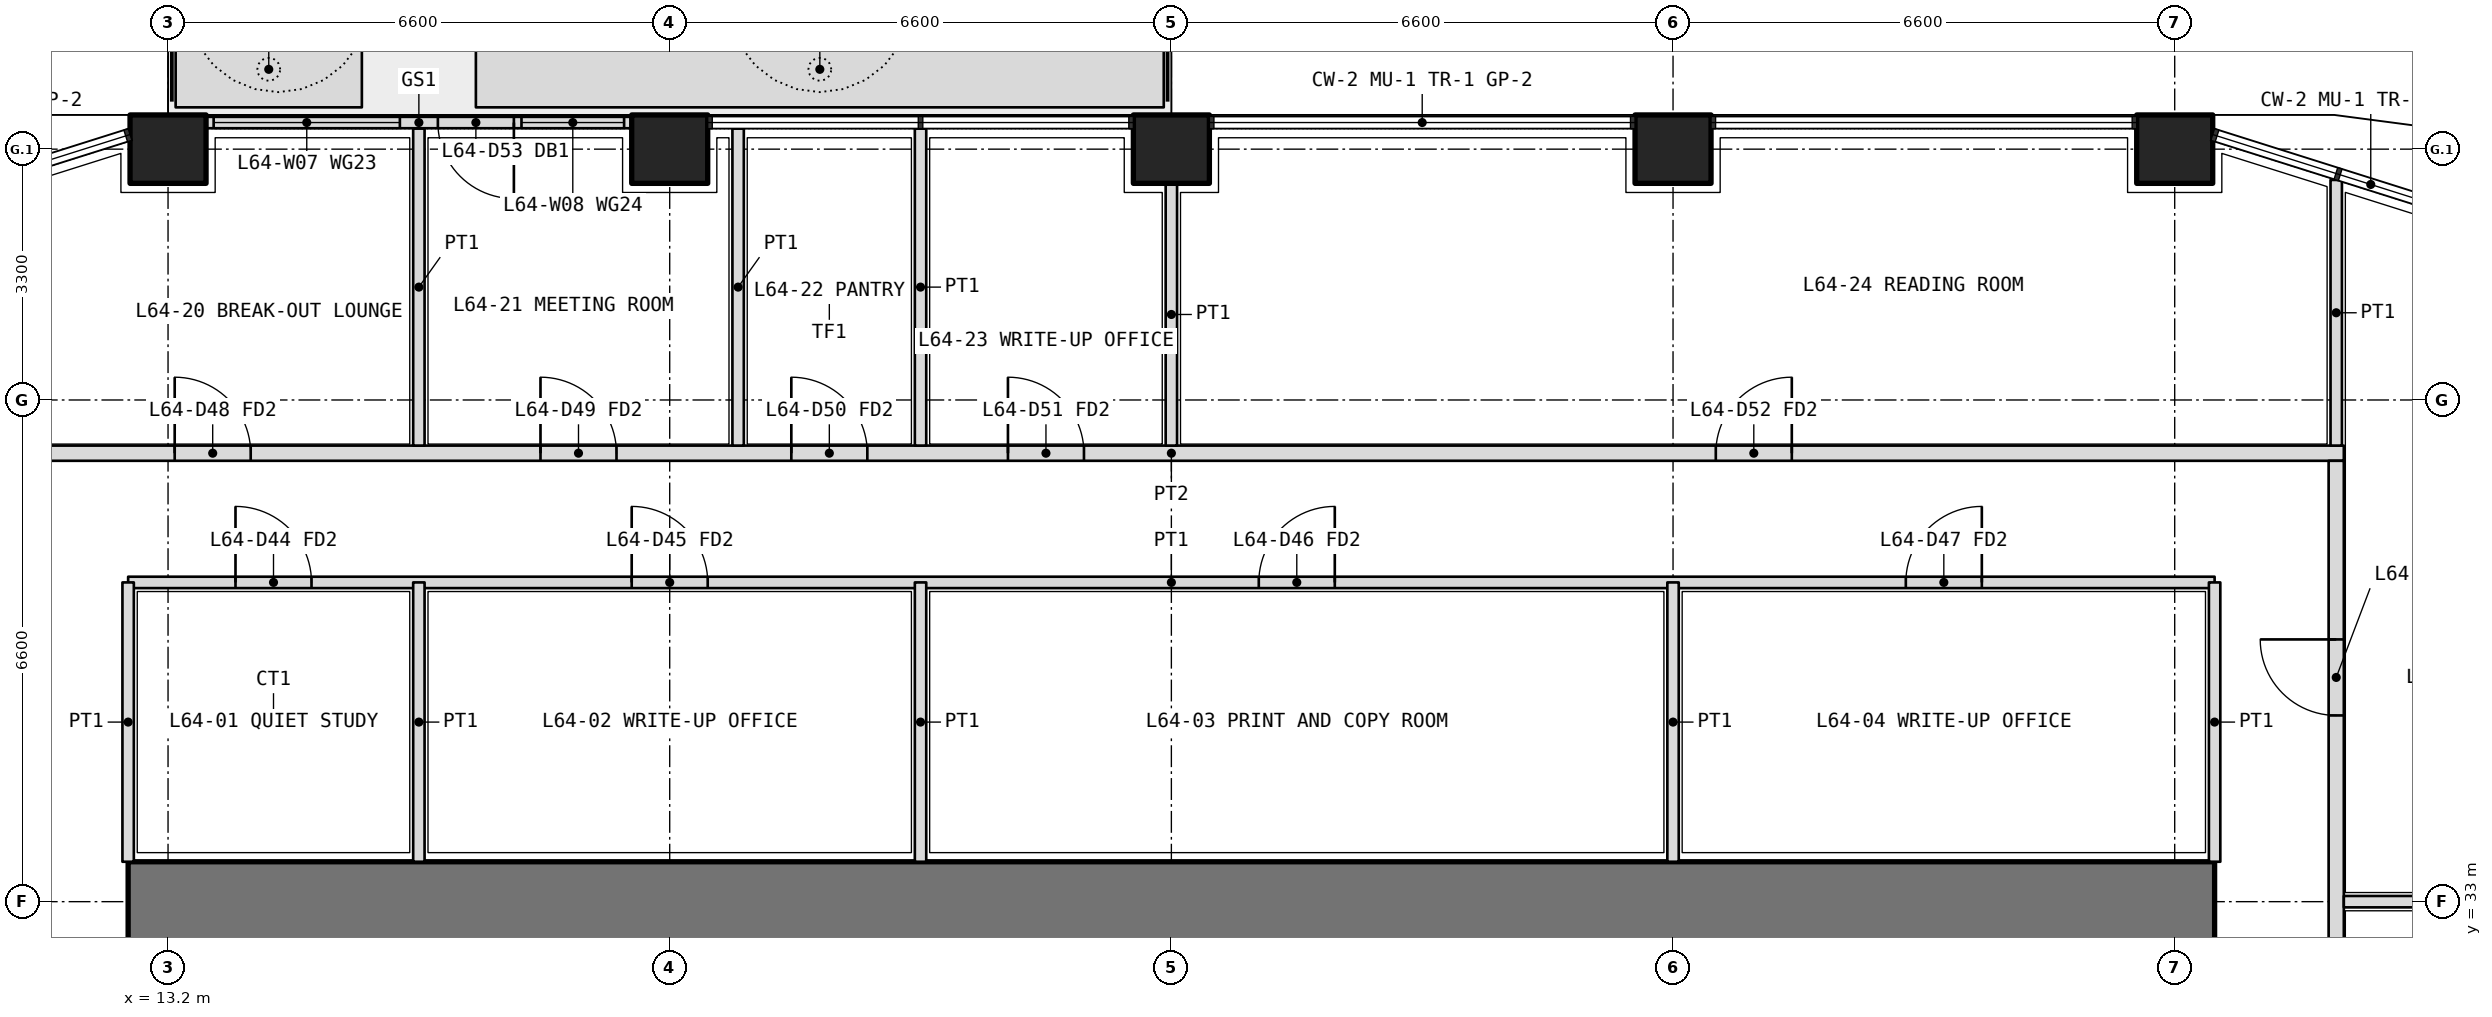
"""IFC4 building model, lengths in metres.
Left out: names, types, materials, properties, quantities, classifications, styles, units other than length and angle.
Written with IfcOpenShell. Run it as: python <this file> out.ifc"""

import sys

from ifc_helpers import new_model, si_unit, direction, frame, frame_2d, origin, origin_2d, place, context, subcontext, project, spatial, polyline, rectangle, outline, extrude, element, fill, save


model = new_model("IFC4")
c1 = context("Model", 3, precision=1e-05, world=origin(), true_north=direction((0.0, 1.0)))
c2 = subcontext(c1, "Body", "Model", "MODEL_VIEW")
j1 = project(units=[si_unit("LENGTHUNIT", "METRE"), si_unit("PLANEANGLEUNIT", "RADIAN")], contexts=[c1])
p1 = place(None, origin())
s1 = spatial("IfcSite", under=j1, at=p1, CompositionType="ELEMENT")
p2 = place(p1, origin())
s2 = spatial("IfcBuilding", under=s1, at=p2, CompositionType="ELEMENT")
p3 = place(p2, frame((0.0, 0.0, 279.6)))
s3 = spatial("IfcBuildingStorey", under=s2, at=p3, CompositionType="ELEMENT", Elevation=279.6)
for number, where, z_axis, x_axis in (
    (1, (13.2, 42.9, 0.0), (0.0, 0.0, 1.0), (1.0, 0.0, 0.0)),
    (2, (19.8, 42.9, 0.0), (0.0, 0.0, 1.0), (1.0, 0.0, 0.0)),
    (3, (26.4, 42.9, 0.0), (0.0, 0.0, 1.0), (1.0, 0.0, 0.0)),
    (4, (33.0, 42.9, 0.0), (0.0, 0.0, 1.0), (1.0, 0.0, 0.0)),
    (5, (39.6, 42.9, 0.0), (0.0, 0.0, 1.0), (1.0, 0.0, 0.0)),
):
    element("IfcColumn", number, at=place(p3, frame(where, z_axis=z_axis, x_axis=x_axis)), inside=s3, PredefinedType="COLUMN", context=c2, shape_type="SweptSolid", body=[
        extrude(rectangle(XDim=1.0, YDim=0.9, at=origin_2d()), origin(), (0.0, 0.0, 1.0), 4.2),
    ])
p4 = place(p3, origin())
e6 = element("IfcWall", 6, at=p4, inside=s3, PredefinedType="USERDEFINED", context=c2, shape_type="SweptSolid", body=[
    extrude(outline(polyline([(13.3, 43.45), (15.75, 43.45), (15.75, 44.45), (13.3, 44.45), (13.3, 43.45)]), holes=[polyline([(13.45, 43.6), (15.6, 43.6), (15.6, 44.3), (13.45, 44.3), (13.45, 43.6)])]), origin(), (0.0, 0.0, 1.0), 1.05),
])
p5 = place(p3, origin())
e7 = element("IfcWall", 7, at=p5, inside=s3, PredefinedType="USERDEFINED", context=c2, shape_type="SweptSolid", body=[
    extrude(outline(polyline([(17.25, 43.45), (26.3, 43.45), (26.3, 44.45), (17.25, 44.45), (17.25, 43.45)]), holes=[polyline([(17.4, 43.6), (26.15, 43.6), (26.15, 44.3), (17.4, 44.3), (17.4, 43.6)])]), origin(), (0.0, 0.0, 1.0), 1.05),
])
p6 = place(p3, frame((19.3, 43.25, 0.0), z_axis=(0.0, 0.0, 1.0), x_axis=(-1.0, 0.0, 0.0)))
e8 = element("IfcWall", 8, at=p6, inside=s3, PredefinedType="SOLIDWALL", context=c2, shape_type="SweptSolid", body=[
    extrude(rectangle(XDim=5.6, YDim=0.15, at=frame_2d((2.8, 0.0))), origin(), (0.0, 0.0, 1.0), 2.7),
])
p7 = place(p6, frame((1.55, 0.0, 0.0)))
e9 = element("IfcOpeningElement", 9, at=p7, cuts=e8, PredefinedType="OPENING", context=c2, shape_type="SweptSolid", body=[
    extrude(rectangle(XDim=1.0, YDim=2.4, at=frame_2d((0.5, 1.2))), frame((0.0, 0.085, 0.0), z_axis=(0.0, -1.0, 0.0), x_axis=(1.0, 0.0, 0.0)), (0.0, 0.0, 1.0), 0.17),
])
p8 = place(p6, frame((0.1, 0.0, 0.1)))
e10 = element("IfcOpeningElement", 10, at=p8, cuts=e8, PredefinedType="OPENING", context=c2, shape_type="SweptSolid", body=[
    extrude(rectangle(XDim=1.35, YDim=2.3, at=frame_2d((0.675, 1.15))), frame((0.0, 0.085, 0.0), z_axis=(0.0, -1.0, 0.0), x_axis=(1.0, 0.0, 0.0)), (0.0, 0.0, 1.0), 0.17),
])
p9 = place(p6, frame((3.05, 0.0, 0.1)))
e11 = element("IfcOpeningElement", 11, at=p9, cuts=e8, PredefinedType="OPENING", context=c2, shape_type="SweptSolid", body=[
    extrude(rectangle(XDim=2.45, YDim=2.3, at=frame_2d((1.225, 1.15))), frame((0.0, 0.085, 0.0), z_axis=(0.0, -1.0, 0.0), x_axis=(1.0, 0.0, 0.0)), (0.0, 0.0, 1.0), 0.17),
])
p10 = place(p3, frame((40.125, 33.0, 0.0), z_axis=(0.0, 0.0, 1.0), x_axis=(-1.0, 0.0, 0.0)))
e12 = element("IfcWall", 12, at=p10, inside=s3, PredefinedType="SHEAR", context=c2, shape_type="SweptSolid", body=[
    extrude(rectangle(XDim=27.45, YDim=1.05, at=frame_2d((13.725, 0.0))), origin(), (0.0, 0.0, 1.0), 4.2),
])
p11 = place(p3, frame((12.675, 37.2, 0.0), z_axis=(0.0, 0.0, 1.0), x_axis=(1.0, 0.0, 0.0)))
e13 = element("IfcWall", 13, at=p11, inside=s3, PredefinedType="PARTITIONING", context=c2, shape_type="SweptSolid", body=[
    extrude(rectangle(XDim=27.45, YDim=0.15, at=frame_2d((13.725, 0.0))), origin(), (0.0, 0.0, 1.0), 3.0),
])
p12 = place(p11, frame((1.413, 0.0, 0.0)))
e14 = element("IfcOpeningElement", 14, at=p12, cuts=e13, PredefinedType="OPENING", context=c2, shape_type="SweptSolid", body=[
    extrude(rectangle(XDim=1.0, YDim=2.1, at=frame_2d((0.5, 1.05))), frame((0.0, 0.085, 0.0), z_axis=(0.0, -1.0, 0.0), x_axis=(1.0, 0.0, 0.0)), (0.0, 0.0, 1.0), 0.17),
])
p13 = place(p11, frame((6.625, 0.0, 0.0)))
e15 = element("IfcOpeningElement", 15, at=p13, cuts=e13, PredefinedType="OPENING", context=c2, shape_type="SweptSolid", body=[
    extrude(rectangle(XDim=1.0, YDim=2.1, at=frame_2d((0.5, 1.05))), frame((0.0, 0.085, 0.0), z_axis=(0.0, -1.0, 0.0), x_axis=(1.0, 0.0, 0.0)), (0.0, 0.0, 1.0), 0.17),
])
p14 = place(p11, frame((14.875, 0.0, 0.0)))
e16 = element("IfcOpeningElement", 16, at=p14, cuts=e13, PredefinedType="OPENING", context=c2, shape_type="SweptSolid", body=[
    extrude(rectangle(XDim=1.0, YDim=2.1, at=frame_2d((0.5, 1.05))), frame((0.0, 0.085, 0.0), z_axis=(0.0, -1.0, 0.0), x_axis=(1.0, 0.0, 0.0)), (0.0, 0.0, 1.0), 0.17),
])
p15 = place(p11, frame((23.387, 0.0, 0.0)))
e17 = element("IfcOpeningElement", 17, at=p15, cuts=e13, PredefinedType="OPENING", context=c2, shape_type="SweptSolid", body=[
    extrude(rectangle(XDim=1.0, YDim=2.1, at=frame_2d((0.5, 1.05))), frame((0.0, 0.085, 0.0), z_axis=(0.0, -1.0, 0.0), x_axis=(1.0, 0.0, 0.0)), (0.0, 0.0, 1.0), 0.17),
])
for number, where, z_axis, x_axis in (
    (18, (12.675, 33.525, 0.0), (0.0, 0.0, 1.0), (0.0, 1.0, 0.0)),
    (19, (40.125, 33.525, 0.0), (0.0, 0.0, 1.0), (0.0, 1.0, 0.0)),
):
    element("IfcWall", number, at=place(p3, frame(where, z_axis=z_axis, x_axis=x_axis)), inside=s3, PredefinedType="PARTITIONING", context=c2, shape_type="SweptSolid", body=[
        extrude(rectangle(XDim=3.675, YDim=0.15, at=frame_2d((1.837, 0.0))), origin(), (0.0, 0.0, 1.0), 3.0),
    ])
for number, where, z_axis, x_axis in (
    (20, (16.5, 33.525, 0.0), (0.0, 0.0, 1.0), (0.0, 1.0, 0.0)),
    (21, (23.1, 33.525, 0.0), (0.0, 0.0, 1.0), (0.0, 1.0, 0.0)),
):
    element("IfcWall", number, at=place(p3, frame(where, z_axis=z_axis, x_axis=x_axis)), inside=s3, PredefinedType="PARTITIONING", context=c2, shape_type="SweptSolid", body=[
        extrude(rectangle(XDim=3.675, YDim=0.15, at=frame_2d((1.837, 0.0))), origin(), (0.0, 0.0, 1.0), 3.9),
    ])
p16 = place(p3, frame((33.0, 33.525, 0.0), z_axis=(0.0, 0.0, 1.0), x_axis=(0.0, 1.0, 0.0)))
e22 = element("IfcWall", 22, at=p16, inside=s3, PredefinedType="PARTITIONING", context=c2, shape_type="SweptSolid", body=[
    extrude(rectangle(XDim=3.675, YDim=0.15, at=frame_2d((1.837, 0.0))), origin(), (0.0, 0.0, 1.0), 3.0),
])
p17 = place(p3, frame((10.975, 38.9, 0.0), z_axis=(0.0, 0.0, 1.0), x_axis=(1.0, 0.0, 0.0)))
e23 = element("IfcWall", 23, at=p17, inside=s3, PredefinedType="PARTITIONING", context=c2, shape_type="SweptSolid", body=[
    extrude(rectangle(XDim=30.85, YDim=0.2, at=frame_2d((15.425, 0.0))), origin(), (0.0, 0.0, 1.0), 3.0),
])
p18 = place(p17, frame((2.312, 0.0, 0.0)))
e24 = element("IfcOpeningElement", 24, at=p18, cuts=e23, PredefinedType="OPENING", context=c2, shape_type="SweptSolid", body=[
    extrude(rectangle(XDim=1.0, YDim=2.1, at=frame_2d((0.5, 1.05))), frame((0.0, 0.11, 0.0), z_axis=(0.0, -1.0, 0.0), x_axis=(1.0, 0.0, 0.0)), (0.0, 0.0, 1.0), 0.22),
])
p19 = place(p17, frame((7.125, 0.0, 0.0)))
e25 = element("IfcOpeningElement", 25, at=p19, cuts=e23, PredefinedType="OPENING", context=c2, shape_type="SweptSolid", body=[
    extrude(rectangle(XDim=1.0, YDim=2.1, at=frame_2d((0.5, 1.05))), frame((0.0, 0.11, 0.0), z_axis=(0.0, -1.0, 0.0), x_axis=(1.0, 0.0, 0.0)), (0.0, 0.0, 1.0), 0.22),
])
p20 = place(p17, frame((10.425, 0.0, 0.0)))
e26 = element("IfcOpeningElement", 26, at=p20, cuts=e23, PredefinedType="OPENING", context=c2, shape_type="SweptSolid", body=[
    extrude(rectangle(XDim=1.0, YDim=2.1, at=frame_2d((0.5, 1.05))), frame((0.0, 0.11, 0.0), z_axis=(0.0, -1.0, 0.0), x_axis=(1.0, 0.0, 0.0)), (0.0, 0.0, 1.0), 0.22),
])
p21 = place(p17, frame((13.275, 0.0, 0.0)))
e27 = element("IfcOpeningElement", 27, at=p21, cuts=e23, PredefinedType="OPENING", context=c2, shape_type="SweptSolid", body=[
    extrude(rectangle(XDim=1.0, YDim=2.1, at=frame_2d((0.5, 1.05))), frame((0.0, 0.11, 0.0), z_axis=(0.0, -1.0, 0.0), x_axis=(1.0, 0.0, 0.0)), (0.0, 0.0, 1.0), 0.22),
])
p22 = place(p17, frame((22.587, 0.0, 0.0)))
e28 = element("IfcOpeningElement", 28, at=p22, cuts=e23, PredefinedType="OPENING", context=c2, shape_type="SweptSolid", body=[
    extrude(rectangle(XDim=1.0, YDim=2.1, at=frame_2d((0.5, 1.05))), frame((0.0, 0.11, 0.0), z_axis=(0.0, -1.0, 0.0), x_axis=(1.0, 0.0, 0.0)), (0.0, 0.0, 1.0), 0.22),
])
p23 = place(p3, frame((41.725, 7.4, 0.0), z_axis=(0.0, 0.0, 1.0), x_axis=(0.0, 1.0, 0.0)))
e29 = element("IfcWall", 29, at=p23, inside=s3, PredefinedType="PARTITIONING", context=c2, shape_type="SweptSolid", body=[
    extrude(rectangle(XDim=31.4, YDim=0.2, at=frame_2d((15.7, 0.0))), origin(), (0.0, 0.0, 1.0), 3.0),
])
p24 = place(p23, frame((3.9, 0.0, 0.0)))
e30 = element("IfcOpeningElement", 30, at=p24, cuts=e29, PredefinedType="OPENING", context=c2, shape_type="SweptSolid", body=[
    extrude(rectangle(XDim=1.2, YDim=2.1, at=frame_2d((0.6, 1.05))), frame((0.0, 0.11, 0.0), z_axis=(0.0, -1.0, 0.0), x_axis=(1.0, 0.0, 0.0)), (0.0, 0.0, 1.0), 0.22),
])
p25 = place(p23, frame((10.25, 0.0, 0.0)))
e31 = element("IfcOpeningElement", 31, at=p25, cuts=e29, PredefinedType="OPENING", context=c2, shape_type="SweptSolid", body=[
    extrude(rectangle(XDim=1.0, YDim=2.1, at=frame_2d((0.5, 1.05))), frame((0.0, 0.11, 0.0), z_axis=(0.0, -1.0, 0.0), x_axis=(1.0, 0.0, 0.0)), (0.0, 0.0, 1.0), 0.22),
])
p26 = place(p23, frame((13.4, 0.0, 0.0)))
e32 = element("IfcOpeningElement", 32, at=p26, cuts=e29, PredefinedType="OPENING", context=c2, shape_type="SweptSolid", body=[
    extrude(rectangle(XDim=1.0, YDim=2.1, at=frame_2d((0.5, 1.05))), frame((0.0, 0.11, 0.0), z_axis=(0.0, -1.0, 0.0), x_axis=(1.0, 0.0, 0.0)), (0.0, 0.0, 1.0), 0.22),
])
p27 = place(p23, frame((16.75, 0.0, 0.0)))
e33 = element("IfcOpeningElement", 33, at=p27, cuts=e29, PredefinedType="OPENING", context=c2, shape_type="SweptSolid", body=[
    extrude(rectangle(XDim=0.9, YDim=2.1, at=frame_2d((0.45, 1.05))), frame((0.0, 0.11, 0.0), z_axis=(0.0, -1.0, 0.0), x_axis=(1.0, 0.0, 0.0)), (0.0, 0.0, 1.0), 0.22),
])
p28 = place(p23, frame((20.15, 0.0, 0.0)))
e34 = element("IfcOpeningElement", 34, at=p28, cuts=e29, PredefinedType="OPENING", context=c2, shape_type="SweptSolid", body=[
    extrude(rectangle(XDim=1.0, YDim=2.1, at=frame_2d((0.5, 1.05))), frame((0.0, 0.11, 0.0), z_axis=(0.0, -1.0, 0.0), x_axis=(1.0, 0.0, 0.0)), (0.0, 0.0, 1.0), 0.22),
])
p29 = place(p23, frame((23.45, 0.0, 0.0)))
e35 = element("IfcOpeningElement", 35, at=p29, cuts=e29, PredefinedType="OPENING", context=c2, shape_type="SweptSolid", body=[
    extrude(rectangle(XDim=1.0, YDim=2.1, at=frame_2d((0.5, 1.05))), frame((0.0, 0.11, 0.0), z_axis=(0.0, -1.0, 0.0), x_axis=(1.0, 0.0, 0.0)), (0.0, 0.0, 1.0), 0.22),
])
p30 = place(p23, frame((28.05, 0.0, 0.0)))
e36 = element("IfcOpeningElement", 36, at=p30, cuts=e29, PredefinedType="OPENING", context=c2, shape_type="SweptSolid", body=[
    extrude(rectangle(XDim=1.0, YDim=2.1, at=frame_2d((0.5, 1.05))), frame((0.0, 0.11, 0.0), z_axis=(0.0, -1.0, 0.0), x_axis=(1.0, 0.0, 0.0)), (0.0, 0.0, 1.0), 0.22),
])
p31 = place(p3, frame((41.725, 42.495, 0.0), z_axis=(0.0, 0.0, 1.0), x_axis=(0.0, -1.0, 0.0)))
e37 = element("IfcWall", 37, at=p31, inside=s3, PredefinedType="PARTITIONING", context=c2, shape_type="SweptSolid", body=[
    extrude(rectangle(XDim=3.495, YDim=0.15, at=frame_2d((1.748, 0.0))), origin(), (0.0, 0.0, 1.0), 2.7),
])
p32 = place(p3, frame((45.75, 33.0, 0.0), z_axis=(0.0, 0.0, 1.0), x_axis=(-1.0, 0.0, 0.0)))
e38 = element("IfcWall", 38, at=p32, inside=s3, PredefinedType="PARTITIONING", context=c2, shape_type="SweptSolid", body=[
    extrude(rectangle(XDim=3.925, YDim=0.15, at=frame_2d((1.962, 0.0))), origin(), (0.0, 0.0, 1.0), 3.0),
])
for number, where, z_axis, x_axis in (
    (39, (20.7, 43.17, 0.0), (0.0, 0.0, 1.0), (0.0, -1.0, 0.0)),
    (40, (23.1, 43.17, 0.0), (0.0, 0.0, 1.0), (0.0, -1.0, 0.0)),
    (41, (16.5, 43.17, 0.0), (0.0, 0.0, 1.0), (0.0, -1.0, 0.0)),
):
    element("IfcWall", number, at=place(p3, frame(where, z_axis=z_axis, x_axis=x_axis)), inside=s3, PredefinedType="PARTITIONING", context=c2, shape_type="SweptSolid", body=[
        extrude(rectangle(XDim=4.17, YDim=0.15, at=frame_2d((2.085, 0.0))), origin(), (0.0, 0.0, 1.0), 2.7),
    ])
p33 = place(p3, frame((26.4, 42.45, 0.0), z_axis=(0.0, 0.0, 1.0), x_axis=(0.0, -1.0, 0.0)))
e42 = element("IfcWall", 42, at=p33, inside=s3, PredefinedType="PARTITIONING", context=c2, shape_type="SweptSolid", body=[
    extrude(rectangle(XDim=3.45, YDim=0.15, at=frame_2d((1.725, 0.0))), origin(), (0.0, 0.0, 1.0), 3.0),
])
p34 = place(p7, origin())
e43 = element("IfcDoor", 43, at=p34, inside=s3, OperationType="SINGLE_SWING_LEFT", PredefinedType="DOOR", context=c2, shape_type="SweptSolid", body=[
    extrude(rectangle(XDim=1.0, YDim=2.4, at=frame_2d((0.5, 1.2))), frame((0.0, 0.025, 0.0), z_axis=(0.0, -1.0, 0.0), x_axis=(1.0, 0.0, 0.0)), (0.0, 0.0, 1.0), 0.05),
])
fill(e9, e43)
p35 = place(p8, origin())
e44 = element("IfcWindow", 44, at=p35, inside=s3, PartitioningType="SINGLE_PANEL", PredefinedType="WINDOW", context=c2, shape_type="SweptSolid", body=[
    extrude(rectangle(XDim=1.35, YDim=2.3, at=frame_2d((0.675, 1.15))), frame((0.0, 0.03, 0.0), z_axis=(0.0, -1.0, 0.0), x_axis=(1.0, 0.0, 0.0)), (0.0, 0.0, 1.0), 0.06),
])
fill(e10, e44)
p36 = place(p9, origin())
e45 = element("IfcWindow", 45, at=p36, inside=s3, PartitioningType="SINGLE_PANEL", PredefinedType="WINDOW", context=c2, shape_type="SweptSolid", body=[
    extrude(rectangle(XDim=2.45, YDim=2.3, at=frame_2d((1.225, 1.15))), frame((0.0, 0.03, 0.0), z_axis=(0.0, -1.0, 0.0), x_axis=(1.0, 0.0, 0.0)), (0.0, 0.0, 1.0), 0.06),
])
fill(e11, e45)
p37 = place(p12, origin())
e46 = element("IfcDoor", 46, at=p37, inside=s3, OperationType="SINGLE_SWING_LEFT", PredefinedType="DOOR", context=c2, shape_type="SweptSolid", body=[
    extrude(rectangle(XDim=1.0, YDim=2.1, at=frame_2d((0.5, 1.05))), frame((0.0, 0.025, 0.0), z_axis=(0.0, -1.0, 0.0), x_axis=(1.0, 0.0, 0.0)), (0.0, 0.0, 1.0), 0.05),
])
fill(e14, e46)
p38 = place(p13, origin())
e47 = element("IfcDoor", 47, at=p38, inside=s3, OperationType="SINGLE_SWING_LEFT", PredefinedType="DOOR", context=c2, shape_type="SweptSolid", body=[
    extrude(rectangle(XDim=1.0, YDim=2.1, at=frame_2d((0.5, 1.05))), frame((0.0, 0.025, 0.0), z_axis=(0.0, -1.0, 0.0), x_axis=(1.0, 0.0, 0.0)), (0.0, 0.0, 1.0), 0.05),
])
fill(e15, e47)
p39 = place(p14, origin())
e48 = element("IfcDoor", 48, at=p39, inside=s3, OperationType="SINGLE_SWING_RIGHT", PredefinedType="DOOR", context=c2, shape_type="SweptSolid", body=[
    extrude(rectangle(XDim=1.0, YDim=2.1, at=frame_2d((0.5, 1.05))), frame((0.0, 0.025, 0.0), z_axis=(0.0, -1.0, 0.0), x_axis=(1.0, 0.0, 0.0)), (0.0, 0.0, 1.0), 0.05),
])
fill(e16, e48)
p40 = place(p15, origin())
e49 = element("IfcDoor", 49, at=p40, inside=s3, OperationType="SINGLE_SWING_RIGHT", PredefinedType="DOOR", context=c2, shape_type="SweptSolid", body=[
    extrude(rectangle(XDim=1.0, YDim=2.1, at=frame_2d((0.5, 1.05))), frame((0.0, 0.025, 0.0), z_axis=(0.0, -1.0, 0.0), x_axis=(1.0, 0.0, 0.0)), (0.0, 0.0, 1.0), 0.05),
])
fill(e17, e49)
p41 = place(p30, origin())
e50 = element("IfcDoor", 50, at=p41, inside=s3, OperationType="SINGLE_SWING_RIGHT", PredefinedType="DOOR", context=c2, shape_type="SweptSolid", body=[
    extrude(rectangle(XDim=1.0, YDim=2.1, at=frame_2d((0.5, 1.05))), frame((0.0, 0.025, 0.0), z_axis=(0.0, -1.0, 0.0), x_axis=(1.0, 0.0, 0.0)), (0.0, 0.0, 1.0), 0.05),
])
fill(e36, e50)
p42 = place(p18, origin())
e51 = element("IfcDoor", 51, at=p42, inside=s3, OperationType="SINGLE_SWING_LEFT", PredefinedType="DOOR", context=c2, shape_type="SweptSolid", body=[
    extrude(rectangle(XDim=1.0, YDim=2.1, at=frame_2d((0.5, 1.05))), frame((0.0, 0.025, 0.0), z_axis=(0.0, -1.0, 0.0), x_axis=(1.0, 0.0, 0.0)), (0.0, 0.0, 1.0), 0.05),
])
fill(e24, e51)
p43 = place(p19, origin())
e52 = element("IfcDoor", 52, at=p43, inside=s3, OperationType="SINGLE_SWING_LEFT", PredefinedType="DOOR", context=c2, shape_type="SweptSolid", body=[
    extrude(rectangle(XDim=1.0, YDim=2.1, at=frame_2d((0.5, 1.05))), frame((0.0, 0.025, 0.0), z_axis=(0.0, -1.0, 0.0), x_axis=(1.0, 0.0, 0.0)), (0.0, 0.0, 1.0), 0.05),
])
fill(e25, e52)
p44 = place(p20, origin())
e53 = element("IfcDoor", 53, at=p44, inside=s3, OperationType="SINGLE_SWING_LEFT", PredefinedType="DOOR", context=c2, shape_type="SweptSolid", body=[
    extrude(rectangle(XDim=1.0, YDim=2.1, at=frame_2d((0.5, 1.05))), frame((0.0, 0.025, 0.0), z_axis=(0.0, -1.0, 0.0), x_axis=(1.0, 0.0, 0.0)), (0.0, 0.0, 1.0), 0.05),
])
fill(e26, e53)
p45 = place(p21, origin())
e54 = element("IfcDoor", 54, at=p45, inside=s3, OperationType="SINGLE_SWING_LEFT", PredefinedType="DOOR", context=c2, shape_type="SweptSolid", body=[
    extrude(rectangle(XDim=1.0, YDim=2.1, at=frame_2d((0.5, 1.05))), frame((0.0, 0.025, 0.0), z_axis=(0.0, -1.0, 0.0), x_axis=(1.0, 0.0, 0.0)), (0.0, 0.0, 1.0), 0.05),
])
fill(e27, e54)
p46 = place(p22, origin())
e55 = element("IfcDoor", 55, at=p46, inside=s3, OperationType="SINGLE_SWING_RIGHT", PredefinedType="DOOR", context=c2, shape_type="SweptSolid", body=[
    extrude(rectangle(XDim=1.0, YDim=2.1, at=frame_2d((0.5, 1.05))), frame((0.0, 0.025, 0.0), z_axis=(0.0, -1.0, 0.0), x_axis=(1.0, 0.0, 0.0)), (0.0, 0.0, 1.0), 0.05),
])
fill(e28, e55)
save(model, sys.argv[1])
